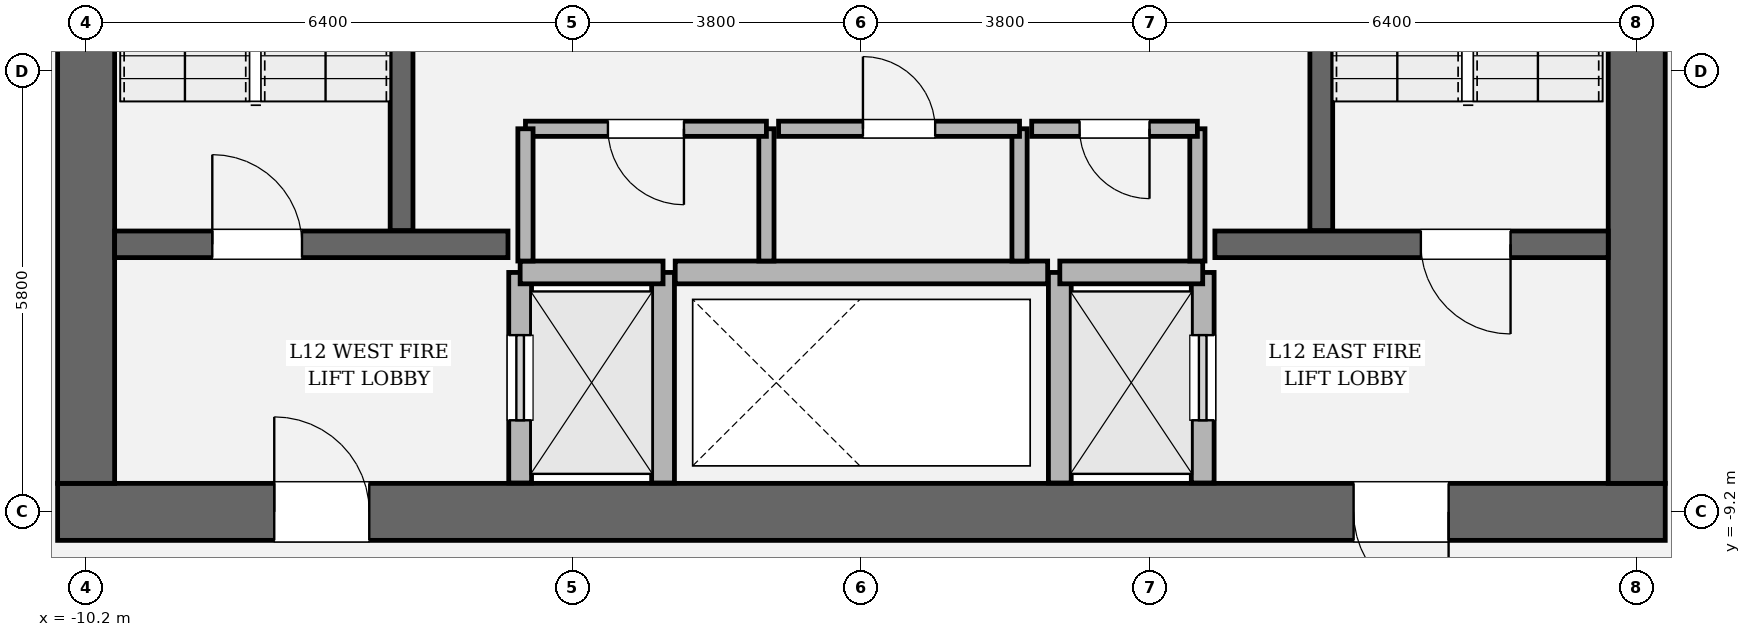
"""IFC4 building model, lengths in metres.
Left out: names, types, materials, properties, quantities, classifications, styles, units other than length and angle.
Written with IfcOpenShell. Run it as: python <this file> out.ifc"""

import sys

from ifc_helpers import new_model, si_unit, direction, frame, frame_2d, origin, place, context, subcontext, project, spatial, rectangle, extrude, element, fill, save


model = new_model("IFC4")
c1 = context("Model", 3, precision=1e-05, world=origin(), true_north=direction((0.0, 1.0)))
c2 = subcontext(c1, "Body", "Model", "MODEL_VIEW")
j1 = project(units=[si_unit("LENGTHUNIT", "METRE"), si_unit("PLANEANGLEUNIT", "RADIAN")], contexts=[c1])
p1 = place(None, origin())
s1 = spatial("IfcSite", under=j1, at=p1, CompositionType="ELEMENT")
p2 = place(p1, origin())
s2 = spatial("IfcBuilding", under=s1, at=p2, CompositionType="ELEMENT")
p3 = place(p2, frame((0.0, 0.0, 56.55)))
s3 = spatial("IfcBuildingStorey", under=s2, at=p3, CompositionType="ELEMENT", Elevation=56.55)
p4 = place(p3, frame((10.575, -9.2, 0.0), z_axis=(0.0, 0.0, 1.0), x_axis=(-1.0, 0.0, 0.0)))
e1 = element("IfcWall", 1, at=p4, inside=s3, PredefinedType="SHEAR", context=c2, shape_type="SweptSolid", body=[
    extrude(rectangle(XDim=21.15, YDim=0.75, at=frame_2d((10.575, 0.0))), origin(), (0.0, 0.0, 1.0), 4.05),
])
p5 = place(p4, frame((2.85, 0.0, 0.0)))
e2 = element("IfcOpeningElement", 2, at=p5, cuts=e1, PredefinedType="OPENING", context=c2, shape_type="SweptSolid", body=[
    extrude(rectangle(XDim=1.25, YDim=2.25, at=frame_2d((0.625, 1.125))), frame((0.0, 0.385, 0.0), z_axis=(0.0, -1.0, 0.0), x_axis=(1.0, 0.0, 0.0)), (0.0, 0.0, 1.0), 0.77),
])
p6 = place(p4, frame((17.05, 0.0, 0.0)))
e3 = element("IfcOpeningElement", 3, at=p6, cuts=e1, PredefinedType="OPENING", context=c2, shape_type="SweptSolid", body=[
    extrude(rectangle(XDim=1.25, YDim=2.25, at=frame_2d((0.625, 1.125))), frame((0.0, 0.385, 0.0), z_axis=(0.0, -1.0, 0.0), x_axis=(1.0, 0.0, 0.0)), (0.0, 0.0, 1.0), 0.77),
])
p7 = place(p3, frame((-10.2, -8.825, 0.0), z_axis=(0.0, 0.0, 1.0), x_axis=(0.0, 1.0, 0.0)))
e4 = element("IfcWall", 4, at=p7, inside=s3, PredefinedType="SHEAR", context=c2, shape_type="SweptSolid", body=[
    extrude(rectangle(XDim=17.65, YDim=0.75, at=frame_2d((8.825, 0.0))), origin(), (0.0, 0.0, 1.0), 4.05),
])
p8 = place(p7, frame((12.615, 0.0, 0.0)))
e5 = element("IfcOpeningElement", 5, at=p8, cuts=e4, PredefinedType="OPENING", context=c2, shape_type="SweptSolid", body=[
    extrude(rectangle(XDim=1.18, YDim=2.2, at=frame_2d((0.59, 1.1))), frame((0.0, 0.385, 0.0), z_axis=(0.0, -1.0, 0.0), x_axis=(1.0, 0.0, 0.0)), (0.0, 0.0, 1.0), 0.77),
])
p9 = place(p3, frame((10.2, 8.825, 0.0), z_axis=(0.0, 0.0, 1.0), x_axis=(0.0, -1.0, 0.0)))
e6 = element("IfcWall", 6, at=p9, inside=s3, PredefinedType="SHEAR", context=c2, shape_type="SweptSolid", body=[
    extrude(rectangle(XDim=17.65, YDim=0.75, at=frame_2d((8.825, 0.0))), origin(), (0.0, 0.0, 1.0), 4.05),
])
p10 = place(p9, frame((3.855, 0.0, 0.0)))
e7 = element("IfcOpeningElement", 7, at=p10, cuts=e6, PredefinedType="OPENING", context=c2, shape_type="SweptSolid", body=[
    extrude(rectangle(XDim=1.18, YDim=2.2, at=frame_2d((0.59, 1.1))), frame((0.0, 0.385, 0.0), z_axis=(0.0, -1.0, 0.0), x_axis=(1.0, 0.0, 0.0)), (0.0, 0.0, 1.0), 0.77),
])
for number, where, z_axis, x_axis in (
    (8, (-6.05, -5.5, 0.0), (0.0, 0.0, 1.0), (0.0, 1.0, 0.0)),
    (9, (6.05, 3.45, 0.0), (0.0, 0.0, 1.0), (0.0, -1.0, 0.0)),
):
    element("IfcWall", number, at=place(p3, frame(where, z_axis=z_axis, x_axis=x_axis)), inside=s3, PredefinedType="SOLIDWALL", context=c2, shape_type="SweptSolid", body=[
        extrude(rectangle(XDim=8.95, YDim=0.3, at=frame_2d((4.475, 0.0))), origin(), (0.0, 0.0, 1.0), 4.05),
    ])
p11 = place(p3, frame((-9.825, -5.68, 0.0), z_axis=(0.0, 0.0, 1.0), x_axis=(1.0, 0.0, 0.0)))
e10 = element("IfcWall", 10, at=p11, inside=s3, PredefinedType="SOLIDWALL", context=c2, shape_type="SweptSolid", body=[
    extrude(rectangle(XDim=5.175, YDim=0.35, at=frame_2d((2.587, 0.0))), origin(), (0.0, 0.0, 1.0), 4.05),
])
p12 = place(p11, frame((1.285, 0.0, 0.0)))
e11 = element("IfcOpeningElement", 11, at=p12, cuts=e10, PredefinedType="OPENING", context=c2, shape_type="SweptSolid", body=[
    extrude(rectangle(XDim=1.18, YDim=2.2, at=frame_2d((0.59, 1.1))), frame((0.0, 0.185, 0.0), z_axis=(0.0, -1.0, 0.0), x_axis=(1.0, 0.0, 0.0)), (0.0, 0.0, 1.0), 0.37),
])
p13 = place(p3, frame((4.65, -5.68, 0.0), z_axis=(0.0, 0.0, 1.0), x_axis=(1.0, 0.0, 0.0)))
e12 = element("IfcWall", 12, at=p13, inside=s3, PredefinedType="SOLIDWALL", context=c2, shape_type="SweptSolid", body=[
    extrude(rectangle(XDim=5.175, YDim=0.35, at=frame_2d((2.587, 0.0))), origin(), (0.0, 0.0, 1.0), 4.05),
])
p14 = place(p13, frame((2.71, 0.0, 0.0)))
e13 = element("IfcOpeningElement", 13, at=p14, cuts=e12, PredefinedType="OPENING", context=c2, shape_type="SweptSolid", body=[
    extrude(rectangle(XDim=1.18, YDim=2.2, at=frame_2d((0.59, 1.1))), frame((0.0, 0.185, 0.0), z_axis=(0.0, -1.0, 0.0), x_axis=(1.0, 0.0, 0.0)), (0.0, 0.0, 1.0), 0.37),
])
p15 = place(p3, frame((-4.49, -8.82, 0.0), z_axis=(0.0, 0.0, 1.0), x_axis=(0.0, 1.0, 0.0)))
e14 = element("IfcWall", 14, at=p15, inside=s3, PredefinedType="SOLIDWALL", context=c2, shape_type="SweptSolid", body=[
    extrude(rectangle(XDim=2.77, YDim=0.3, at=frame_2d((1.385, 0.0))), origin(), (0.0, 0.0, 1.0), 3.77),
])
p16 = place(p15, frame((0.825, 0.0, 0.0)))
e15 = element("IfcOpeningElement", 15, at=p16, cuts=e14, PredefinedType="OPENING", context=c2, shape_type="SweptSolid", body=[
    extrude(rectangle(XDim=1.12, YDim=2.25, at=frame_2d((0.56, 1.125))), frame((0.0, 0.16, 0.0), z_axis=(0.0, -1.0, 0.0), x_axis=(1.0, 0.0, 0.0)), (0.0, 0.0, 1.0), 0.32),
])
p17 = place(p3, frame((-2.61, -8.82, 0.0), z_axis=(0.0, 0.0, 1.0), x_axis=(0.0, 1.0, 0.0)))
e16 = element("IfcWall", 16, at=p17, inside=s3, PredefinedType="SOLIDWALL", context=c2, shape_type="SweptSolid", body=[
    extrude(rectangle(XDim=2.77, YDim=0.3, at=frame_2d((1.385, 0.0))), origin(), (0.0, 0.0, 1.0), 3.77),
])
p18 = place(p3, frame((-4.49, -6.05, 0.0), z_axis=(0.0, 0.0, 1.0), x_axis=(1.0, 0.0, 0.0)))
e17 = element("IfcWall", 17, at=p18, inside=s3, PredefinedType="SOLIDWALL", context=c2, shape_type="SweptSolid", body=[
    extrude(rectangle(XDim=1.88, YDim=0.3, at=frame_2d((0.94, 0.0))), origin(), (0.0, 0.0, 1.0), 3.77),
])
p19 = place(p3, frame((4.49, -8.82, 0.0), z_axis=(0.0, 0.0, 1.0), x_axis=(0.0, 1.0, 0.0)))
e18 = element("IfcWall", 18, at=p19, inside=s3, PredefinedType="SOLIDWALL", context=c2, shape_type="SweptSolid", body=[
    extrude(rectangle(XDim=2.77, YDim=0.3, at=frame_2d((1.385, 0.0))), origin(), (0.0, 0.0, 1.0), 3.77),
])
p20 = place(p19, frame((0.825, 0.0, 0.0)))
e19 = element("IfcOpeningElement", 19, at=p20, cuts=e18, PredefinedType="OPENING", context=c2, shape_type="SweptSolid", body=[
    extrude(rectangle(XDim=1.12, YDim=2.25, at=frame_2d((0.56, 1.125))), frame((0.0, 0.16, 0.0), z_axis=(0.0, -1.0, 0.0), x_axis=(1.0, 0.0, 0.0)), (0.0, 0.0, 1.0), 0.32),
])
p21 = place(p3, frame((2.61, -8.82, 0.0), z_axis=(0.0, 0.0, 1.0), x_axis=(0.0, 1.0, 0.0)))
e20 = element("IfcWall", 20, at=p21, inside=s3, PredefinedType="SOLIDWALL", context=c2, shape_type="SweptSolid", body=[
    extrude(rectangle(XDim=2.77, YDim=0.3, at=frame_2d((1.385, 0.0))), origin(), (0.0, 0.0, 1.0), 3.77),
])
p22 = place(p3, frame((2.61, -6.05, 0.0), z_axis=(0.0, 0.0, 1.0), x_axis=(1.0, 0.0, 0.0)))
e21 = element("IfcWall", 21, at=p22, inside=s3, PredefinedType="SOLIDWALL", context=c2, shape_type="SweptSolid", body=[
    extrude(rectangle(XDim=1.88, YDim=0.3, at=frame_2d((0.94, 0.0))), origin(), (0.0, 0.0, 1.0), 3.77),
])
p23 = place(p3, frame((-2.45, -6.05, 0.0), z_axis=(0.0, 0.0, 1.0), x_axis=(1.0, 0.0, 0.0)))
e22 = element("IfcWall", 22, at=p23, inside=s3, PredefinedType="SOLIDWALL", context=c2, shape_type="SweptSolid", body=[
    extrude(rectangle(XDim=4.9, YDim=0.3, at=frame_2d((2.45, 0.0))), origin(), (0.0, 0.0, 1.0), 3.77),
])
p24 = place(p3, frame((-1.25, -5.9, 0.0), z_axis=(0.0, 0.0, 1.0), x_axis=(0.0, 1.0, 0.0)))
e23 = element("IfcWall", 23, at=p24, inside=s3, PredefinedType="SOLIDWALL", context=c2, shape_type="SweptSolid", body=[
    extrude(rectangle(XDim=1.74, YDim=0.2, at=frame_2d((0.87, 0.0))), origin(), (0.0, 0.0, 1.0), 3.77),
])
p25 = place(p3, frame((-1.25, -4.16, 0.0), z_axis=(0.0, 0.0, 1.0), x_axis=(-1.0, 0.0, 0.0)))
e24 = element("IfcWall", 24, at=p25, inside=s3, PredefinedType="SOLIDWALL", context=c2, shape_type="SweptSolid", body=[
    extrude(rectangle(XDim=3.17, YDim=0.2, at=frame_2d((1.585, 0.0))), origin(), (0.0, 0.0, 1.0), 3.77),
])
p26 = place(p25, frame((1.085, 0.0, 0.0)))
e25 = element("IfcOpeningElement", 25, at=p26, cuts=e24, PredefinedType="OPENING", context=c2, shape_type="SweptSolid", body=[
    extrude(rectangle(XDim=1.0, YDim=2.15, at=frame_2d((0.5, 1.075))), frame((0.0, 0.11, 0.0), z_axis=(0.0, -1.0, 0.0), x_axis=(1.0, 0.0, 0.0)), (0.0, 0.0, 1.0), 0.22),
])
for number, where, z_axis, x_axis in (
    (26, (-4.42, -4.16, 0.0), (0.0, 0.0, 1.0), (0.0, -1.0, 0.0)),
    (27, (2.08, -5.9, 0.0), (0.0, 0.0, 1.0), (0.0, 1.0, 0.0)),
):
    element("IfcWall", number, at=place(p3, frame(where, z_axis=z_axis, x_axis=x_axis)), inside=s3, PredefinedType="SOLIDWALL", context=c2, shape_type="SweptSolid", body=[
        extrude(rectangle(XDim=1.74, YDim=0.2, at=frame_2d((0.87, 0.0))), origin(), (0.0, 0.0, 1.0), 3.77),
    ])
p27 = place(p3, frame((2.08, -4.16, 0.0), z_axis=(0.0, 0.0, 1.0), x_axis=(-1.0, 0.0, 0.0)))
e28 = element("IfcWall", 28, at=p27, inside=s3, PredefinedType="SOLIDWALL", context=c2, shape_type="SweptSolid", body=[
    extrude(rectangle(XDim=3.17, YDim=0.2, at=frame_2d((1.585, 0.0))), origin(), (0.0, 0.0, 1.0), 3.77),
])
p28 = place(p27, frame((1.11, 0.0, 0.0)))
e29 = element("IfcOpeningElement", 29, at=p28, cuts=e28, PredefinedType="OPENING", context=c2, shape_type="SweptSolid", body=[
    extrude(rectangle(XDim=0.95, YDim=2.15, at=frame_2d((0.475, 1.075))), frame((0.0, 0.11, 0.0), z_axis=(0.0, -1.0, 0.0), x_axis=(1.0, 0.0, 0.0)), (0.0, 0.0, 1.0), 0.22),
])
p29 = place(p3, frame((4.42, -5.9, 0.0), z_axis=(0.0, 0.0, 1.0), x_axis=(0.0, 1.0, 0.0)))
e30 = element("IfcWall", 30, at=p29, inside=s3, PredefinedType="SOLIDWALL", context=c2, shape_type="SweptSolid", body=[
    extrude(rectangle(XDim=1.74, YDim=0.2, at=frame_2d((0.87, 0.0))), origin(), (0.0, 0.0, 1.0), 3.77),
])
p30 = place(p3, frame((4.42, -4.16, 0.0), z_axis=(0.0, 0.0, 1.0), x_axis=(-1.0, 0.0, 0.0)))
e31 = element("IfcWall", 31, at=p30, inside=s3, PredefinedType="SOLIDWALL", context=c2, shape_type="SweptSolid", body=[
    extrude(rectangle(XDim=2.18, YDim=0.2, at=frame_2d((1.09, 0.0))), origin(), (0.0, 0.0, 1.0), 3.77),
])
p31 = place(p30, frame((0.63, 0.0, 0.0)))
e32 = element("IfcOpeningElement", 32, at=p31, cuts=e31, PredefinedType="OPENING", context=c2, shape_type="SweptSolid", body=[
    extrude(rectangle(XDim=0.92, YDim=2.1, at=frame_2d((0.46, 1.05))), frame((0.0, 0.11, 0.0), z_axis=(0.0, -1.0, 0.0), x_axis=(1.0, 0.0, 0.0)), (0.0, 0.0, 1.0), 0.22),
])
p32 = place(p12, origin())
e33 = element("IfcDoor", 33, at=p32, inside=s3, OperationType="SINGLE_SWING_LEFT", PredefinedType="DOOR", context=c2, shape_type="SweptSolid", body=[
    extrude(rectangle(XDim=1.18, YDim=2.2, at=frame_2d((0.59, 1.1))), frame((0.0, 0.025, 0.0), z_axis=(0.0, -1.0, 0.0), x_axis=(1.0, 0.0, 0.0)), (0.0, 0.0, 1.0), 0.05),
])
fill(e11, e33)
p33 = place(p14, origin())
e34 = element("IfcDoor", 34, at=p33, inside=s3, OperationType="SINGLE_SWING_RIGHT", PredefinedType="DOOR", context=c2, shape_type="SweptSolid", body=[
    extrude(rectangle(XDim=1.18, YDim=2.2, at=frame_2d((0.59, 1.1))), frame((0.0, 0.025, 0.0), z_axis=(0.0, -1.0, 0.0), x_axis=(1.0, 0.0, 0.0)), (0.0, 0.0, 1.0), 0.05),
])
fill(e13, e34)
p34 = place(p5, origin())
e35 = element("IfcDoor", 35, at=p34, inside=s3, OperationType="SINGLE_SWING_LEFT", PredefinedType="DOOR", context=c2, shape_type="SweptSolid", body=[
    extrude(rectangle(XDim=1.25, YDim=2.25, at=frame_2d((0.625, 1.125))), frame((0.0, 0.025, 0.0), z_axis=(0.0, -1.0, 0.0), x_axis=(1.0, 0.0, 0.0)), (0.0, 0.0, 1.0), 0.05),
])
fill(e2, e35)
p35 = place(p6, origin())
e36 = element("IfcDoor", 36, at=p35, inside=s3, OperationType="SINGLE_SWING_RIGHT", PredefinedType="DOOR", context=c2, shape_type="SweptSolid", body=[
    extrude(rectangle(XDim=1.25, YDim=2.25, at=frame_2d((0.625, 1.125))), frame((0.0, 0.025, 0.0), z_axis=(0.0, -1.0, 0.0), x_axis=(1.0, 0.0, 0.0)), (0.0, 0.0, 1.0), 0.05),
])
fill(e3, e36)
p36 = place(p16, origin())
e37 = element("IfcDoor", 37, at=p36, inside=s3, OperationType="SLIDING_TO_LEFT", PredefinedType="DOOR", context=c2, shape_type="SweptSolid", body=[
    extrude(rectangle(XDim=1.12, YDim=2.25, at=frame_2d((0.56, 1.125))), frame((0.0, 0.025, 0.0), z_axis=(0.0, -1.0, 0.0), x_axis=(1.0, 0.0, 0.0)), (0.0, 0.0, 1.0), 0.05),
])
fill(e15, e37)
p37 = place(p20, origin())
e38 = element("IfcDoor", 38, at=p37, inside=s3, OperationType="SLIDING_TO_RIGHT", PredefinedType="DOOR", context=c2, shape_type="SweptSolid", body=[
    extrude(rectangle(XDim=1.12, YDim=2.25, at=frame_2d((0.56, 1.125))), frame((0.0, 0.025, 0.0), z_axis=(0.0, -1.0, 0.0), x_axis=(1.0, 0.0, 0.0)), (0.0, 0.0, 1.0), 0.05),
])
fill(e19, e38)
p38 = place(p26, origin())
e39 = element("IfcDoor", 39, at=p38, inside=s3, OperationType="SINGLE_SWING_LEFT", PredefinedType="DOOR", context=c2, shape_type="SweptSolid", body=[
    extrude(rectangle(XDim=1.0, YDim=2.15, at=frame_2d((0.5, 1.075))), frame((0.0, 0.025, 0.0), z_axis=(0.0, -1.0, 0.0), x_axis=(1.0, 0.0, 0.0)), (0.0, 0.0, 1.0), 0.05),
])
fill(e25, e39)
p39 = place(p28, origin())
e40 = element("IfcDoor", 40, at=p39, inside=s3, OperationType="SINGLE_SWING_RIGHT", PredefinedType="DOOR", context=c2, shape_type="SweptSolid", body=[
    extrude(rectangle(XDim=0.95, YDim=2.15, at=frame_2d((0.475, 1.075))), frame((0.0, 0.025, 0.0), z_axis=(0.0, -1.0, 0.0), x_axis=(1.0, 0.0, 0.0)), (0.0, 0.0, 1.0), 0.05),
])
fill(e29, e40)
p40 = place(p31, origin())
e41 = element("IfcDoor", 41, at=p40, inside=s3, OperationType="SINGLE_SWING_LEFT", PredefinedType="DOOR", context=c2, shape_type="SweptSolid", body=[
    extrude(rectangle(XDim=0.92, YDim=2.1, at=frame_2d((0.46, 1.05))), frame((0.0, 0.025, 0.0), z_axis=(0.0, -1.0, 0.0), x_axis=(1.0, 0.0, 0.0)), (0.0, 0.0, 1.0), 0.05),
])
fill(e32, e41)
save(model, sys.argv[1])
